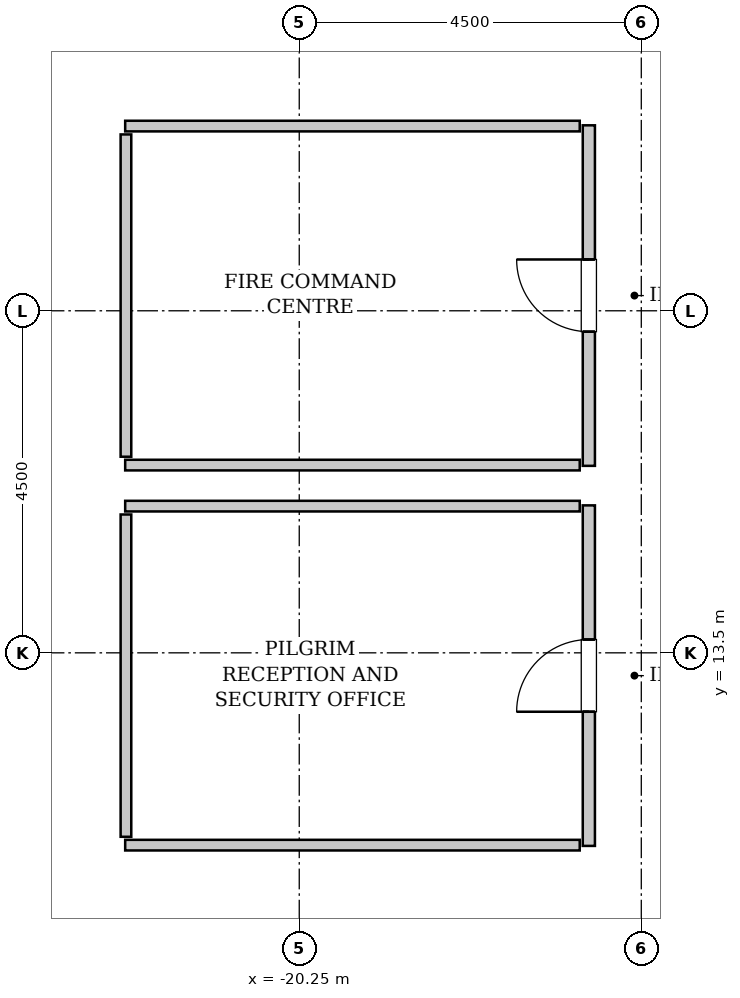
"""IFC4 building model, lengths in metres.
Left out: names, types, materials, properties, quantities, classifications, styles, units other than length and angle.
Written with IfcOpenShell. Run it as: python <this file> out.ifc"""

import sys

from ifc_helpers import new_model, si_unit, direction, frame, frame_2d, origin, place, context, subcontext, project, spatial, rectangle, extrude, source, transform, mapped, element, fill, save


model = new_model("IFC4")
c1 = context("Model", 3, precision=1e-05, world=origin(), true_north=direction((0.0, 1.0)))
c2 = subcontext(c1, "Body", "Model", "MODEL_VIEW")
j1 = project(units=[si_unit("LENGTHUNIT", "METRE"), si_unit("PLANEANGLEUNIT", "RADIAN")], contexts=[c1])
p1 = place(None, origin())
s1 = spatial("IfcSite", under=j1, at=p1, CompositionType="ELEMENT")
p2 = place(p1, origin())
s2 = spatial("IfcBuilding", under=s1, at=p2, CompositionType="ELEMENT")
p3 = place(p2, origin())
s3 = spatial("IfcBuildingStorey", under=s2, at=p3, CompositionType="ELEMENT", Elevation=0.0)
m1 = source(origin(), c2, "Body", "SweptSolid", [
    extrude(rectangle(XDim=4.48, YDim=0.16, at=frame_2d((2.24, 0.0))), origin(), (0.0, 0.0, 1.0), 5.685),
])
p4 = place(p3, frame((-16.44, 15.96, 0.0), z_axis=(0.0, 0.0, 1.0), x_axis=(0.0, 1.0, 0.0)))
e1 = element("IfcWall", 1, at=p4, inside=s3, PredefinedType="PARTITIONING", context=c2, shape_type="MappedRepresentation", body=[
    mapped(m1, transform((0.0, 0.0, 0.0), x_axis=(1.0, 0.0, 0.0), y_axis=(0.0, 1.0, 0.0), z_axis=(0.0, 0.0, 1.0), scale=1.0)),
])
p5 = place(p4, frame((1.765, 0.0, 0.0)))
e2 = element("IfcOpeningElement", 2, at=p5, cuts=e1, PredefinedType="OPENING", context=c2, shape_type="SweptSolid", body=[
    extrude(rectangle(XDim=0.95, YDim=2.1, at=frame_2d((0.475, 1.05))), frame((0.0, 0.09, 0.0), z_axis=(0.0, -1.0, 0.0), x_axis=(1.0, 0.0, 0.0)), (0.0, 0.0, 1.0), 0.18),
])
m2 = source(origin(), c2, "Body", "SweptSolid", [
    extrude(rectangle(XDim=5.98, YDim=0.14, at=frame_2d((2.99, 0.0))), origin(), (0.0, 0.0, 1.0), 5.685),
])
for number, where, z_axis, x_axis in (
    (3, (-22.54, 15.97, 0.0), (0.0, 0.0, 1.0), (1.0, 0.0, 0.0)),
    (4, (-22.54, 20.43, 0.0), (0.0, 0.0, 1.0), (1.0, 0.0, 0.0)),
):
    element("IfcWall", number, at=place(p3, frame(where, z_axis=z_axis, x_axis=x_axis)), inside=s3, PredefinedType="PARTITIONING", context=c2, shape_type="MappedRepresentation", body=[
        mapped(m2, transform((0.0, 0.0, 0.0), x_axis=(1.0, 0.0, 0.0), y_axis=(0.0, 1.0, 0.0), z_axis=(0.0, 0.0, 1.0), scale=1.0)),
    ])
m3 = source(origin(), c2, "Body", "SweptSolid", [
    extrude(rectangle(XDim=4.24, YDim=0.14, at=frame_2d((2.12, 0.0))), origin(), (0.0, 0.0, 1.0), 5.685),
])
p6 = place(p3, frame((-22.53, 16.08, 0.0), z_axis=(0.0, 0.0, 1.0), x_axis=(0.0, 1.0, 0.0)))
e5 = element("IfcWall", 5, at=p6, inside=s3, PredefinedType="PARTITIONING", context=c2, shape_type="MappedRepresentation", body=[
    mapped(m3, transform((0.0, 0.0, 0.0), x_axis=(1.0, 0.0, 0.0), y_axis=(0.0, 1.0, 0.0), z_axis=(0.0, 0.0, 1.0), scale=1.0)),
])
p7 = place(p3, frame((-16.44, 10.96, 0.0), z_axis=(0.0, 0.0, 1.0), x_axis=(0.0, 1.0, 0.0)))
e6 = element("IfcWall", 6, at=p7, inside=s3, PredefinedType="PARTITIONING", context=c2, shape_type="MappedRepresentation", body=[
    mapped(m1, transform((0.0, 0.0, 0.0), x_axis=(1.0, 0.0, 0.0), y_axis=(0.0, 1.0, 0.0), z_axis=(0.0, 0.0, 1.0), scale=1.0)),
])
p8 = place(p7, frame((1.765, 0.0, 0.0)))
e7 = element("IfcOpeningElement", 7, at=p8, cuts=e6, PredefinedType="OPENING", context=c2, shape_type="SweptSolid", body=[
    extrude(rectangle(XDim=0.95, YDim=2.1, at=frame_2d((0.475, 1.05))), frame((0.0, 0.09, 0.0), z_axis=(0.0, -1.0, 0.0), x_axis=(1.0, 0.0, 0.0)), (0.0, 0.0, 1.0), 0.18),
])
for number, where, z_axis, x_axis in (
    (8, (-22.54, 10.97, 0.0), (0.0, 0.0, 1.0), (1.0, 0.0, 0.0)),
    (9, (-22.54, 15.43, 0.0), (0.0, 0.0, 1.0), (1.0, 0.0, 0.0)),
):
    element("IfcWall", number, at=place(p3, frame(where, z_axis=z_axis, x_axis=x_axis)), inside=s3, PredefinedType="PARTITIONING", context=c2, shape_type="MappedRepresentation", body=[
        mapped(m2, transform((0.0, 0.0, 0.0), x_axis=(1.0, 0.0, 0.0), y_axis=(0.0, 1.0, 0.0), z_axis=(0.0, 0.0, 1.0), scale=1.0)),
    ])
p9 = place(p3, frame((-22.53, 11.08, 0.0), z_axis=(0.0, 0.0, 1.0), x_axis=(0.0, 1.0, 0.0)))
e10 = element("IfcWall", 10, at=p9, inside=s3, PredefinedType="PARTITIONING", context=c2, shape_type="MappedRepresentation", body=[
    mapped(m3, transform((0.0, 0.0, 0.0), x_axis=(1.0, 0.0, 0.0), y_axis=(0.0, 1.0, 0.0), z_axis=(0.0, 0.0, 1.0), scale=1.0)),
])
m4 = source(origin(), c2, "Body", "SweptSolid", [
    extrude(rectangle(XDim=0.95, YDim=2.1, at=frame_2d((0.475, 1.05))), frame((0.0, 0.025, 0.0), z_axis=(0.0, -1.0, 0.0), x_axis=(1.0, 0.0, 0.0)), (0.0, 0.0, 1.0), 0.05),
])
p10 = place(p5, origin())
e11 = element("IfcDoor", 11, at=p10, inside=s3, OperationType="SINGLE_SWING_RIGHT", PredefinedType="DOOR", context=c2, shape_type="MappedRepresentation", body=[
    mapped(m4, transform((0.0, 0.0, 0.0), x_axis=(1.0, 0.0, 0.0), y_axis=(0.0, 1.0, 0.0), z_axis=(0.0, 0.0, 1.0), scale=1.0)),
])
fill(e2, e11)
p11 = place(p8, origin())
e12 = element("IfcDoor", 12, at=p11, inside=s3, OperationType="SINGLE_SWING_LEFT", PredefinedType="DOOR", context=c2, shape_type="MappedRepresentation", body=[
    mapped(m4, transform((0.0, 0.0, 0.0), x_axis=(1.0, 0.0, 0.0), y_axis=(0.0, 1.0, 0.0), z_axis=(0.0, 0.0, 1.0), scale=1.0)),
])
fill(e7, e12)
save(model, sys.argv[1])
